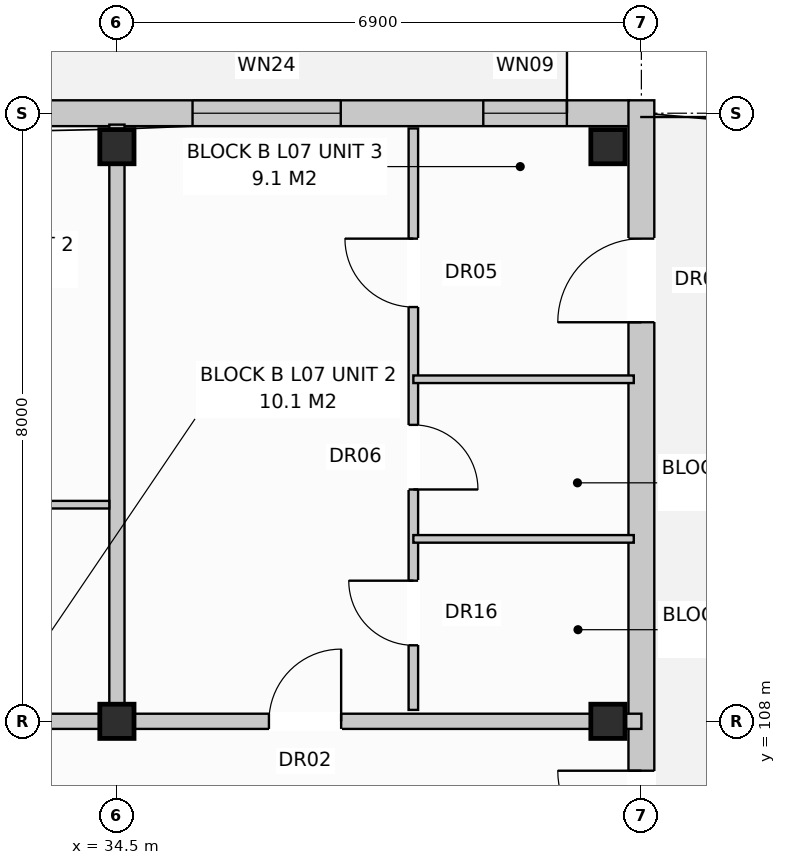
"""IFC4 building model, lengths in metres.
Left out: names, types, materials, properties, quantities, classifications, styles, units other than length and angle.
Written with IfcOpenShell. Run it as: python <this file> out.ifc"""

import sys

from ifc_helpers import new_model, si_unit, direction, frame, frame_2d, origin, origin_with_axes, origin_2d, place, context, subcontext, project, spatial, rectangle, extrude, element, fill, save


model = new_model("IFC4")
c1 = context("Model", 3, precision=1e-05, world=origin(), true_north=direction((0.0, 1.0)))
c2 = subcontext(c1, "Body", "Model", "MODEL_VIEW")
j1 = project(units=[si_unit("LENGTHUNIT", "METRE"), si_unit("PLANEANGLEUNIT", "RADIAN")], contexts=[c1])
p1 = place(None, origin())
s1 = spatial("IfcSite", under=j1, at=p1, CompositionType="ELEMENT")
p2 = place(p1, origin())
s2 = spatial("IfcBuilding", under=s1, at=p2, CompositionType="ELEMENT")
p3 = place(p2, frame((0.0, 0.0, 24.0)))
s3 = spatial("IfcBuildingStorey", under=s2, at=p3, CompositionType="ELEMENT", Elevation=24.0)
for number, where, z_axis, x_axis in (
    (1, (34.5, 108.0, 0.0), (0.0, 0.0, 1.0), (1.0, 0.0, 0.0)),
    (2, (34.5, 115.56, 0.0), (0.0, 0.0, 1.0), (1.0, 0.0, 0.0)),
    (3, (40.96, 108.0, 0.0), (0.0, 0.0, 1.0), (1.0, 0.0, 0.0)),
    (4, (40.96, 115.56, 0.0), (0.0, 0.0, 1.0), (1.0, 0.0, 0.0)),
):
    element("IfcColumn", number, at=place(p3, frame(where, z_axis=z_axis, x_axis=x_axis)), inside=s3, PredefinedType="COLUMN", context=c2, shape_type="SweptSolid", body=[
        extrude(rectangle(XDim=0.45, YDim=0.45, at=origin_2d()), origin(), (0.0, 0.0, 1.0), 3.2),
    ])
p4 = place(p3, frame((0.16, 116.0, 0.0), z_axis=(0.0, 0.0, 1.0), x_axis=(1.0, 0.0, 0.0)))
e5 = element("IfcWall", 5, at=p4, inside=s3, PredefinedType="STANDARD", context=c2, shape_type="SweptSolid", body=[
    extrude(rectangle(XDim=41.08, YDim=0.34, at=frame_2d((20.54, 0.0))), origin(), (0.0, 0.0, 1.0), 2.95),
])
p5 = place(p4, frame((3.789, 0.0, 0.0)))
e6 = element("IfcOpeningElement", 6, at=p5, cuts=e5, PredefinedType="OPENING", context=c2, shape_type="SweptSolid", body=[
    extrude(rectangle(XDim=1.05, YDim=2.12, at=frame_2d((0.525, 1.06))), frame((0.0, 0.182, 0.0), z_axis=(0.0, -1.0, 0.0), x_axis=(1.0, 0.0, 0.0)), (0.0, 0.0, 1.0), 0.364),
])
p6 = place(p4, frame((18.689, 0.0, 0.0)))
e7 = element("IfcOpeningElement", 7, at=p6, cuts=e5, PredefinedType="OPENING", context=c2, shape_type="SweptSolid", body=[
    extrude(rectangle(XDim=1.05, YDim=2.12, at=frame_2d((0.525, 1.06))), frame((0.0, 0.182, 0.0), z_axis=(0.0, -1.0, 0.0), x_axis=(1.0, 0.0, 0.0)), (0.0, 0.0, 1.0), 0.364),
])
p7 = place(p4, frame((29.089, 0.0, 0.0)))
e8 = element("IfcOpeningElement", 8, at=p7, cuts=e5, PredefinedType="OPENING", context=c2, shape_type="SweptSolid", body=[
    extrude(rectangle(XDim=1.05, YDim=2.12, at=frame_2d((0.525, 1.06))), frame((0.0, 0.182, 0.0), z_axis=(0.0, -1.0, 0.0), x_axis=(1.0, 0.0, 0.0)), (0.0, 0.0, 1.0), 0.364),
])
p8 = place(p4, frame((1.56, 0.0, 0.8)))
e9 = element("IfcOpeningElement", 9, at=p8, cuts=e5, PredefinedType="OPENING", context=c2, shape_type="SweptSolid", body=[
    extrude(rectangle(XDim=1.9, YDim=1.85, at=frame_2d((0.95, 0.925))), frame((0.0, 0.182, 0.0), z_axis=(0.0, -1.0, 0.0), x_axis=(1.0, 0.0, 0.0)), (0.0, 0.0, 1.0), 0.364),
])
p9 = place(p4, frame((7.192, 0.0, 0.8)))
e10 = element("IfcOpeningElement", 10, at=p9, cuts=e5, PredefinedType="OPENING", context=c2, shape_type="SweptSolid", body=[
    extrude(rectangle(XDim=1.95, YDim=1.65, at=frame_2d((0.975, 0.825))), frame((0.0, 0.182, 0.0), z_axis=(0.0, -1.0, 0.0), x_axis=(1.0, 0.0, 0.0)), (0.0, 0.0, 1.0), 0.364),
])
p10 = place(p4, frame((10.86, 0.0, 0.72)))
e11 = element("IfcOpeningElement", 11, at=p10, cuts=e5, PredefinedType="OPENING", context=c2, shape_type="SweptSolid", body=[
    extrude(rectangle(XDim=1.1, YDim=1.5, at=frame_2d((0.55, 0.75))), frame((0.0, 0.182, 0.0), z_axis=(0.0, -1.0, 0.0), x_axis=(1.0, 0.0, 0.0)), (0.0, 0.0, 1.0), 0.364),
])
p11 = place(p4, frame((15.86, 0.0, 0.8)))
e12 = element("IfcOpeningElement", 12, at=p11, cuts=e5, PredefinedType="OPENING", context=c2, shape_type="SweptSolid", body=[
    extrude(rectangle(XDim=1.9, YDim=1.85, at=frame_2d((0.95, 0.925))), frame((0.0, 0.182, 0.0), z_axis=(0.0, -1.0, 0.0), x_axis=(1.0, 0.0, 0.0)), (0.0, 0.0, 1.0), 0.364),
])
p12 = place(p4, frame((21.535, 0.0, 0.8)))
e13 = element("IfcOpeningElement", 13, at=p12, cuts=e5, PredefinedType="OPENING", context=c2, shape_type="SweptSolid", body=[
    extrude(rectangle(XDim=1.95, YDim=1.65, at=frame_2d((0.975, 0.825))), frame((0.0, 0.182, 0.0), z_axis=(0.0, -1.0, 0.0), x_axis=(1.0, 0.0, 0.0)), (0.0, 0.0, 1.0), 0.364),
])
p13 = place(p4, frame((25.61, 0.0, 0.72)))
e14 = element("IfcOpeningElement", 14, at=p13, cuts=e5, PredefinedType="OPENING", context=c2, shape_type="SweptSolid", body=[
    extrude(rectangle(XDim=1.1, YDim=1.5, at=frame_2d((0.55, 0.75))), frame((0.0, 0.182, 0.0), z_axis=(0.0, -1.0, 0.0), x_axis=(1.0, 0.0, 0.0)), (0.0, 0.0, 1.0), 0.364),
])
p14 = place(p4, frame((31.36, 0.0, 0.72)))
e15 = element("IfcOpeningElement", 15, at=p14, cuts=e5, PredefinedType="OPENING", context=c2, shape_type="SweptSolid", body=[
    extrude(rectangle(XDim=1.9, YDim=1.85, at=frame_2d((0.95, 0.925))), frame((0.0, 0.182, 0.0), z_axis=(0.0, -1.0, 0.0), x_axis=(1.0, 0.0, 0.0)), (0.0, 0.0, 1.0), 0.364),
])
p15 = place(p4, frame((35.335, 0.0, 0.8)))
e16 = element("IfcOpeningElement", 16, at=p15, cuts=e5, PredefinedType="OPENING", context=c2, shape_type="SweptSolid", body=[
    extrude(rectangle(XDim=1.95, YDim=1.65, at=frame_2d((0.975, 0.825))), frame((0.0, 0.182, 0.0), z_axis=(0.0, -1.0, 0.0), x_axis=(1.0, 0.0, 0.0)), (0.0, 0.0, 1.0), 0.364),
])
p16 = place(p4, frame((39.16, 0.0, 0.72)))
e17 = element("IfcOpeningElement", 17, at=p16, cuts=e5, PredefinedType="OPENING", context=c2, shape_type="SweptSolid", body=[
    extrude(rectangle(XDim=1.1, YDim=1.5, at=frame_2d((0.55, 0.75))), frame((0.0, 0.182, 0.0), z_axis=(0.0, -1.0, 0.0), x_axis=(1.0, 0.0, 0.0)), (0.0, 0.0, 1.0), 0.364),
])
p17 = place(p3, frame((41.4, 97.43, 0.0), z_axis=(0.0, 0.0, 1.0), x_axis=(0.0, 1.0, 0.0)))
e18 = element("IfcWall", 18, at=p17, inside=s3, PredefinedType="STANDARD", context=c2, shape_type="SweptSolid", body=[
    extrude(rectangle(XDim=18.74, YDim=0.34, at=frame_2d((9.37, 0.0))), origin(), (0.0, 0.0, 1.0), 2.95),
])
p18 = place(p17, frame((8.82, 0.0, 0.0)))
e19 = element("IfcOpeningElement", 19, at=p18, cuts=e18, PredefinedType="OPENING", context=c2, shape_type="SweptSolid", body=[
    extrude(rectangle(XDim=1.1, YDim=2.1, at=frame_2d((0.55, 1.05))), frame((0.0, 0.182, 0.0), z_axis=(0.0, -1.0, 0.0), x_axis=(1.0, 0.0, 0.0)), (0.0, 0.0, 1.0), 0.364),
])
p19 = place(p17, frame((15.82, 0.0, 0.0)))
e20 = element("IfcOpeningElement", 20, at=p19, cuts=e18, PredefinedType="OPENING", context=c2, shape_type="SweptSolid", body=[
    extrude(rectangle(XDim=1.1, YDim=2.1, at=frame_2d((0.55, 1.05))), frame((0.0, 0.182, 0.0), z_axis=(0.0, -1.0, 0.0), x_axis=(1.0, 0.0, 0.0)), (0.0, 0.0, 1.0), 0.364),
])
p20 = place(p17, frame((1.72, 0.0, 0.72)))
e21 = element("IfcOpeningElement", 21, at=p20, cuts=e18, PredefinedType="OPENING", context=c2, shape_type="SweptSolid", body=[
    extrude(rectangle(XDim=1.1, YDim=1.5, at=frame_2d((0.55, 0.75))), frame((0.0, 0.182, 0.0), z_axis=(0.0, -1.0, 0.0), x_axis=(1.0, 0.0, 0.0)), (0.0, 0.0, 1.0), 0.364),
])
p21 = place(p3, frame((34.5, 108.15, 0.0), z_axis=(0.0, 0.0, 1.0), x_axis=(0.0, 1.0, 0.0)))
e22 = element("IfcWall", 22, at=p21, inside=s3, PredefinedType="PARTITIONING", context=c2, shape_type="SweptSolid", body=[
    extrude(rectangle(XDim=7.7, YDim=0.2, at=frame_2d((3.85, 0.0))), origin(), (0.0, 0.0, 1.0), 2.39),
])
p22 = place(p3, frame((13.8, 108.0, 0.0), z_axis=(0.0, 0.0, 1.0), x_axis=(1.0, 0.0, 0.0)))
e23 = element("IfcWall", 23, at=p22, inside=s3, PredefinedType="PARTITIONING", context=c2, shape_type="SweptSolid", body=[
    extrude(rectangle(XDim=20.7, YDim=0.2, at=frame_2d((10.35, 0.0))), origin(), (0.0, 0.0, 1.0), 2.39),
])
p23 = place(p22, frame((2.4, 0.0, 0.0)))
e24 = element("IfcOpeningElement", 24, at=p23, cuts=e23, PredefinedType="OPENING", context=c2, shape_type="SweptSolid", body=[
    extrude(rectangle(XDim=0.95, YDim=2.15, at=frame_2d((0.475, 1.075))), frame((0.0, 0.112, 0.0), z_axis=(0.0, -1.0, 0.0), x_axis=(1.0, 0.0, 0.0)), (0.0, 0.0, 1.0), 0.224),
])
p24 = place(p3, frame((20.1, 110.85, 0.0), z_axis=(0.0, 0.0, 1.0), x_axis=(1.0, 0.0, 0.0)))
e25 = element("IfcWall", 25, at=p24, inside=s3, PredefinedType="PARTITIONING", context=c2, shape_type="SweptSolid", body=[
    extrude(rectangle(XDim=14.3, YDim=0.1, at=frame_2d((7.15, 0.0))), origin(), (0.0, 0.0, 1.0), 2.95),
])
p25 = place(p24, frame((1.6, 0.0, 0.0)))
e26 = element("IfcOpeningElement", 26, at=p25, cuts=e25, PredefinedType="OPENING", context=c2, shape_type="SweptSolid", body=[
    extrude(rectangle(XDim=0.9, YDim=2.1, at=frame_2d((0.45, 1.05))), frame((0.0, 0.062, 0.0), z_axis=(0.0, -1.0, 0.0), x_axis=(1.0, 0.0, 0.0)), (0.0, 0.0, 1.0), 0.124),
])
p26 = place(p24, frame((5.1, 0.0, 0.0)))
e27 = element("IfcOpeningElement", 27, at=p26, cuts=e25, PredefinedType="OPENING", context=c2, shape_type="SweptSolid", body=[
    extrude(rectangle(XDim=0.85, YDim=2.05, at=frame_2d((0.425, 1.025))), frame((0.0, 0.062, 0.0), z_axis=(0.0, -1.0, 0.0), x_axis=(1.0, 0.0, 0.0)), (0.0, 0.0, 1.0), 0.124),
])
p27 = place(p24, frame((8.2, 0.0, 0.0)))
e28 = element("IfcOpeningElement", 28, at=p27, cuts=e25, PredefinedType="OPENING", context=c2, shape_type="SweptSolid", body=[
    extrude(rectangle(XDim=0.85, YDim=2.05, at=frame_2d((0.425, 1.025))), frame((0.0, 0.062, 0.0), z_axis=(0.0, -1.0, 0.0), x_axis=(1.0, 0.0, 0.0)), (0.0, 0.0, 1.0), 0.124),
])
p28 = place(p24, frame((11.6, 0.0, 0.0)))
e29 = element("IfcOpeningElement", 29, at=p28, cuts=e25, PredefinedType="OPENING", context=c2, shape_type="SweptSolid", body=[
    extrude(rectangle(XDim=0.85, YDim=2.05, at=frame_2d((0.425, 1.025))), frame((0.0, 0.062, 0.0), z_axis=(0.0, -1.0, 0.0), x_axis=(1.0, 0.0, 0.0)), (0.0, 0.0, 1.0), 0.124),
])
p29 = place(p3, frame((34.5, 108.0, 0.0), z_axis=(0.0, 0.0, 1.0), x_axis=(1.0, 0.0, 0.0)))
e30 = element("IfcWall", 30, at=p29, inside=s3, PredefinedType="PARTITIONING", context=c2, shape_type="SweptSolid", body=[
    extrude(rectangle(XDim=6.9, YDim=0.2, at=frame_2d((3.45, 0.0))), origin(), (0.0, 0.0, 1.0), 2.39),
])
p30 = place(p29, frame((2.0, 0.0, 0.0)))
e31 = element("IfcOpeningElement", 31, at=p30, cuts=e30, PredefinedType="OPENING", context=c2, shape_type="SweptSolid", body=[
    extrude(rectangle(XDim=0.95, YDim=2.15, at=frame_2d((0.475, 1.075))), frame((0.0, 0.112, 0.0), z_axis=(0.0, -1.0, 0.0), x_axis=(1.0, 0.0, 0.0)), (0.0, 0.0, 1.0), 0.224),
])
p31 = place(p3, frame((38.4, 108.15, 0.0), z_axis=(0.0, 0.0, 1.0), x_axis=(0.0, 1.0, 0.0)))
e32 = element("IfcWall", 32, at=p31, inside=s3, PredefinedType="PARTITIONING", context=c2, shape_type="SweptSolid", body=[
    extrude(rectangle(XDim=7.65, YDim=0.125, at=frame_2d((3.825, 0.0))), origin(), (0.0, 0.0, 1.0), 2.95),
])
p32 = place(p31, frame((0.85, 0.0, 0.0)))
e33 = element("IfcOpeningElement", 33, at=p32, cuts=e32, PredefinedType="OPENING", context=c2, shape_type="SweptSolid", body=[
    extrude(rectangle(XDim=0.85, YDim=2.1, at=frame_2d((0.425, 1.05))), frame((0.0, 0.074, 0.0), z_axis=(0.0, -1.0, 0.0), x_axis=(1.0, 0.0, 0.0)), (0.0, 0.0, 1.0), 0.149),
])
p33 = place(p31, frame((2.9, 0.0, 0.0)))
e34 = element("IfcOpeningElement", 34, at=p33, cuts=e32, PredefinedType="OPENING", context=c2, shape_type="SweptSolid", body=[
    extrude(rectangle(XDim=0.85, YDim=2.05, at=frame_2d((0.425, 1.025))), frame((0.0, 0.074, 0.0), z_axis=(0.0, -1.0, 0.0), x_axis=(1.0, 0.0, 0.0)), (0.0, 0.0, 1.0), 0.149),
])
p34 = place(p31, frame((5.3, 0.0, 0.0)))
e35 = element("IfcOpeningElement", 35, at=p34, cuts=e32, PredefinedType="OPENING", context=c2, shape_type="SweptSolid", body=[
    extrude(rectangle(XDim=0.9, YDim=2.1, at=frame_2d((0.45, 1.05))), frame((0.0, 0.074, 0.0), z_axis=(0.0, -1.0, 0.0), x_axis=(1.0, 0.0, 0.0)), (0.0, 0.0, 1.0), 0.149),
])
for number, where, z_axis, x_axis in (
    (36, (38.4, 110.4, 0.0), (0.0, 0.0, 1.0), (1.0, 0.0, 0.0)),
    (37, (38.4, 112.5, 0.0), (0.0, 0.0, 1.0), (1.0, 0.0, 0.0)),
):
    element("IfcWall", number, at=place(p3, frame(where, z_axis=z_axis, x_axis=x_axis)), inside=s3, PredefinedType="PARTITIONING", context=c2, shape_type="SweptSolid", body=[
        extrude(rectangle(XDim=2.9, YDim=0.1, at=frame_2d((1.45, 0.0))), origin(), (0.0, 0.0, 1.0), 2.95),
    ])
p35 = place(p15, origin_with_axes())
e38 = element("IfcWindow", 38, at=p35, inside=s3, PartitioningType="SINGLE_PANEL", PredefinedType="WINDOW", context=c2, shape_type="SweptSolid", body=[
    extrude(rectangle(XDim=1.95, YDim=1.65, at=frame_2d((0.975, 0.825))), frame((0.0, 0.03, 0.0), z_axis=(0.0, -1.0, 0.0), x_axis=(1.0, 0.0, 0.0)), (0.0, 0.0, 1.0), 0.06),
])
fill(e16, e38)
p36 = place(p16, origin_with_axes())
e39 = element("IfcWindow", 39, at=p36, inside=s3, PartitioningType="SINGLE_PANEL", PredefinedType="WINDOW", context=c2, shape_type="SweptSolid", body=[
    extrude(rectangle(XDim=1.1, YDim=1.5, at=frame_2d((0.55, 0.75))), frame((0.0, 0.03, 0.0), z_axis=(0.0, -1.0, 0.0), x_axis=(1.0, 0.0, 0.0)), (0.0, 0.0, 1.0), 0.06),
])
fill(e17, e39)
p37 = place(p18, origin_with_axes())
e40 = element("IfcDoor", 40, at=p37, inside=s3, OperationType="SINGLE_SWING_RIGHT", PredefinedType="DOOR", context=c2, shape_type="SweptSolid", body=[
    extrude(rectangle(XDim=1.1, YDim=2.1, at=frame_2d((0.55, 1.05))), frame((0.0, 0.025, 0.0), z_axis=(0.0, -1.0, 0.0), x_axis=(1.0, 0.0, 0.0)), (0.0, 0.0, 1.0), 0.05),
])
fill(e19, e40)
p38 = place(p19, origin_with_axes())
e41 = element("IfcDoor", 41, at=p38, inside=s3, OperationType="SINGLE_SWING_LEFT", PredefinedType="DOOR", context=c2, shape_type="SweptSolid", body=[
    extrude(rectangle(XDim=1.1, YDim=2.1, at=frame_2d((0.55, 1.05))), frame((0.0, 0.025, 0.0), z_axis=(0.0, -1.0, 0.0), x_axis=(1.0, 0.0, 0.0)), (0.0, 0.0, 1.0), 0.05),
])
fill(e20, e41)
p39 = place(p30, origin_with_axes())
e42 = element("IfcDoor", 42, at=p39, inside=s3, OperationType="SINGLE_SWING_RIGHT", PredefinedType="DOOR", context=c2, shape_type="SweptSolid", body=[
    extrude(rectangle(XDim=0.95, YDim=2.15, at=frame_2d((0.475, 1.075))), frame((0.0, 0.025, 0.0), z_axis=(0.0, -1.0, 0.0), x_axis=(1.0, 0.0, 0.0)), (0.0, 0.0, 1.0), 0.05),
])
fill(e31, e42)
p40 = place(p32, origin_with_axes())
e43 = element("IfcDoor", 43, at=p40, inside=s3, OperationType="SINGLE_SWING_RIGHT", PredefinedType="DOOR", context=c2, shape_type="SweptSolid", body=[
    extrude(rectangle(XDim=0.85, YDim=2.1, at=frame_2d((0.425, 1.05))), frame((0.0, 0.025, 0.0), z_axis=(0.0, -1.0, 0.0), x_axis=(1.0, 0.0, 0.0)), (0.0, 0.0, 1.0), 0.05),
])
fill(e33, e43)
p41 = place(p33, frame((0.85, 0.0, 0.0), z_axis=(0.0, 0.0, 1.0), x_axis=(-1.0, 0.0, 0.0)))
e44 = element("IfcDoor", 44, at=p41, inside=s3, OperationType="SINGLE_SWING_LEFT", PredefinedType="DOOR", context=c2, shape_type="SweptSolid", body=[
    extrude(rectangle(XDim=0.85, YDim=2.05, at=frame_2d((0.425, 1.025))), frame((0.0, 0.025, 0.0), z_axis=(0.0, -1.0, 0.0), x_axis=(1.0, 0.0, 0.0)), (0.0, 0.0, 1.0), 0.05),
])
fill(e34, e44)
p42 = place(p34, origin_with_axes())
e45 = element("IfcDoor", 45, at=p42, inside=s3, OperationType="SINGLE_SWING_RIGHT", PredefinedType="DOOR", context=c2, shape_type="SweptSolid", body=[
    extrude(rectangle(XDim=0.9, YDim=2.1, at=frame_2d((0.45, 1.05))), frame((0.0, 0.025, 0.0), z_axis=(0.0, -1.0, 0.0), x_axis=(1.0, 0.0, 0.0)), (0.0, 0.0, 1.0), 0.05),
])
fill(e35, e45)
save(model, sys.argv[1])
